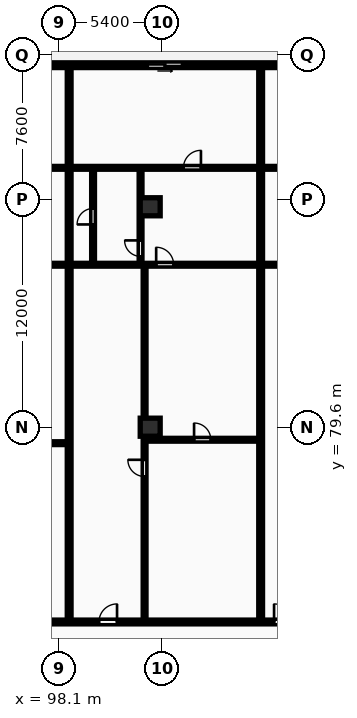
"""IFC4 building model, lengths in metres.
Left out: names, types, materials, properties, quantities, classifications, styles, units other than length and angle.
Written with IfcOpenShell. Run it as: python <this file> out.ifc"""

import sys

from ifc_helpers import new_model, si_unit, direction, frame, frame_2d, origin, origin_2d, place, context, subcontext, project, spatial, rectangle, extrude, element, fill, save


model = new_model("IFC4")
c1 = context("Model", 3, precision=1e-05, world=origin(), true_north=direction((0.0, 1.0)))
c2 = subcontext(c1, "Body", "Model", "MODEL_VIEW")
j1 = project(units=[si_unit("LENGTHUNIT", "METRE"), si_unit("PLANEANGLEUNIT", "RADIAN")], contexts=[c1])
p1 = place(None, origin())
s1 = spatial("IfcSite", under=j1, at=p1, CompositionType="ELEMENT")
p2 = place(p1, origin())
s2 = spatial("IfcBuilding", under=s1, at=p2, CompositionType="ELEMENT")
p3 = place(p2, frame((0.0, 0.0, 24.0)))
s3 = spatial("IfcBuildingStorey", under=s2, at=p3, CompositionType="ELEMENT", Elevation=24.0)
for number, where, z_axis, x_axis in (
    (1, (102.9, 79.6, 0.0), (0.0, 0.0, 1.0), (1.0, 0.0, 0.0)),
    (2, (102.9, 91.2, 0.0), (0.0, 0.0, 1.0), (1.0, 0.0, 0.0)),
):
    element("IfcColumn", number, at=place(p3, frame(where, z_axis=z_axis, x_axis=x_axis)), inside=s3, PredefinedType="COLUMN", context=c2, shape_type="SweptSolid", body=[
        extrude(rectangle(XDim=1.05, YDim=0.95, at=origin_2d()), origin(), (0.0, 0.0, 1.0), 3.25),
    ])
p4 = place(p3, frame((132.9, 98.65, 0.0), z_axis=(0.0, 0.0, 1.0), x_axis=(-1.0, 0.0, 0.0)))
e3 = element("IfcWall", 3, at=p4, inside=s3, PredefinedType="STANDARD", context=c2, shape_type="SweptSolid", body=[
    extrude(rectangle(XDim=77.6, YDim=0.25, at=frame_2d((38.8, 0.0))), origin(), (0.0, 0.0, 1.0), 2.97),
])
p5 = place(p4, frame((71.661, 0.0, 0.0)))
e4 = element("IfcOpeningElement", 4, at=p5, cuts=e3, PredefinedType="OPENING", context=c2, shape_type="SweptSolid", body=[
    extrude(rectangle(XDim=1.8, YDim=2.2, at=frame_2d((0.9, 1.1))), frame((0.0, 0.135, 0.0), z_axis=(0.0, -1.0, 0.0), x_axis=(1.0, 0.0, 0.0)), (0.0, 0.0, 1.0), 0.27),
])
p6 = place(p4, frame((61.079, 0.0, 0.0)))
e5 = element("IfcOpeningElement", 5, at=p6, cuts=e3, PredefinedType="OPENING", context=c2, shape_type="SweptSolid", body=[
    extrude(rectangle(XDim=1.8, YDim=2.2, at=frame_2d((0.9, 1.1))), frame((0.0, 0.135, 0.0), z_axis=(0.0, -1.0, 0.0), x_axis=(1.0, 0.0, 0.0)), (0.0, 0.0, 1.0), 0.27),
])
p7 = place(p4, frame((50.498, 0.0, 0.0)))
e6 = element("IfcOpeningElement", 6, at=p7, cuts=e3, PredefinedType="OPENING", context=c2, shape_type="SweptSolid", body=[
    extrude(rectangle(XDim=1.8, YDim=2.2, at=frame_2d((0.9, 1.1))), frame((0.0, 0.135, 0.0), z_axis=(0.0, -1.0, 0.0), x_axis=(1.0, 0.0, 0.0)), (0.0, 0.0, 1.0), 0.27),
])
p8 = place(p4, frame((39.412, 0.0, 0.0)))
e7 = element("IfcOpeningElement", 7, at=p8, cuts=e3, PredefinedType="OPENING", context=c2, shape_type="SweptSolid", body=[
    extrude(rectangle(XDim=1.8, YDim=2.2, at=frame_2d((0.9, 1.1))), frame((0.0, 0.135, 0.0), z_axis=(0.0, -1.0, 0.0), x_axis=(1.0, 0.0, 0.0)), (0.0, 0.0, 1.0), 0.27),
])
p9 = place(p4, frame((28.326, 0.0, 0.0)))
e8 = element("IfcOpeningElement", 8, at=p9, cuts=e3, PredefinedType="OPENING", context=c2, shape_type="SweptSolid", body=[
    extrude(rectangle(XDim=1.8, YDim=2.2, at=frame_2d((0.9, 1.1))), frame((0.0, 0.135, 0.0), z_axis=(0.0, -1.0, 0.0), x_axis=(1.0, 0.0, 0.0)), (0.0, 0.0, 1.0), 0.27),
])
p10 = place(p4, frame((17.744, 0.0, 0.0)))
e9 = element("IfcOpeningElement", 9, at=p10, cuts=e3, PredefinedType="OPENING", context=c2, shape_type="SweptSolid", body=[
    extrude(rectangle(XDim=1.8, YDim=2.2, at=frame_2d((0.9, 1.1))), frame((0.0, 0.135, 0.0), z_axis=(0.0, -1.0, 0.0), x_axis=(1.0, 0.0, 0.0)), (0.0, 0.0, 1.0), 0.27),
])
p11 = place(p4, frame((6.901, 0.0, 0.0)))
e10 = element("IfcOpeningElement", 10, at=p11, cuts=e3, PredefinedType="OPENING", context=c2, shape_type="SweptSolid", body=[
    extrude(rectangle(XDim=1.8, YDim=2.2, at=frame_2d((0.9, 1.1))), frame((0.0, 0.135, 0.0), z_axis=(0.0, -1.0, 0.0), x_axis=(1.0, 0.0, 0.0)), (0.0, 0.0, 1.0), 0.27),
])
p12 = place(p4, frame((0.6, 0.0, 0.85)))
e11 = element("IfcOpeningElement", 11, at=p12, cuts=e3, PredefinedType="OPENING", context=c2, shape_type="SweptSolid", body=[
    extrude(rectangle(XDim=1.8, YDim=1.8, at=frame_2d((0.9, 0.9))), frame((0.0, 0.135, 0.0), z_axis=(0.0, -1.0, 0.0), x_axis=(1.0, 0.0, 0.0)), (0.0, 0.0, 1.0), 0.27),
])
p13 = place(p3, frame((98.635, 69.43, 0.0), z_axis=(0.0, 0.0, 1.0), x_axis=(0.0, 1.0, 0.0)))
e12 = element("IfcWall", 12, at=p13, inside=s3, PredefinedType="PARTITIONING", context=c2, shape_type="SweptSolid", body=[
    extrude(rectangle(XDim=29.07, YDim=0.2, at=frame_2d((14.535, 0.0))), origin(), (0.0, 0.0, 1.0), 2.97),
])
p14 = place(p3, frame((90.572, 78.76, 0.0), z_axis=(0.0, 0.0, 1.0), x_axis=(1.0, 0.0, 0.0)))
e13 = element("IfcWall", 13, at=p14, inside=s3, PredefinedType="PARTITIONING", context=c2, shape_type="SweptSolid", body=[
    extrude(rectangle(XDim=7.983, YDim=0.15, at=frame_2d((3.992, 0.0))), origin(), (0.0, 0.0, 1.0), 2.97),
])
p15 = place(p14, frame((0.495, 0.0, 0.0)))
e14 = element("IfcOpeningElement", 14, at=p15, cuts=e13, PredefinedType="OPENING", context=c2, shape_type="SweptSolid", body=[
    extrude(rectangle(XDim=0.88, YDim=2.06, at=frame_2d((0.44, 1.03))), frame((0.0, 0.085, 0.0), z_axis=(0.0, -1.0, 0.0), x_axis=(1.0, 0.0, 0.0)), (0.0, 0.0, 1.0), 0.17),
])
p16 = place(p3, frame((86.622, 88.15, 0.0), z_axis=(0.0, 0.0, 1.0), x_axis=(1.0, 0.0, 0.0)))
e15 = element("IfcWall", 15, at=p16, inside=s3, PredefinedType="PARTITIONING", context=c2, shape_type="SweptSolid", body=[
    extrude(rectangle(XDim=11.933, YDim=0.15, at=frame_2d((5.967, 0.0))), origin(), (0.0, 0.0, 1.0), 2.97),
])
p17 = place(p16, frame((5.914, 0.0, 0.0)))
e16 = element("IfcOpeningElement", 16, at=p17, cuts=e15, PredefinedType="OPENING", context=c2, shape_type="SweptSolid", body=[
    extrude(rectangle(XDim=0.92, YDim=2.08, at=frame_2d((0.46, 1.04))), frame((0.0, 0.085, 0.0), z_axis=(0.0, -1.0, 0.0), x_axis=(1.0, 0.0, 0.0)), (0.0, 0.0, 1.0), 0.17),
])
p18 = place(p3, frame((86.622, 93.25, 0.0), z_axis=(0.0, 0.0, 1.0), x_axis=(1.0, 0.0, 0.0)))
e17 = element("IfcWall", 17, at=p18, inside=s3, PredefinedType="PARTITIONING", context=c2, shape_type="SweptSolid", body=[
    extrude(rectangle(XDim=11.933, YDim=0.15, at=frame_2d((5.967, 0.0))), origin(), (0.0, 0.0, 1.0), 2.97),
])
p19 = place(p18, frame((8.812, 0.0, 0.0)))
e18 = element("IfcOpeningElement", 18, at=p19, cuts=e17, PredefinedType="OPENING", context=c2, shape_type="SweptSolid", body=[
    extrude(rectangle(XDim=0.92, YDim=2.08, at=frame_2d((0.46, 1.04))), frame((0.0, 0.085, 0.0), z_axis=(0.0, -1.0, 0.0), x_axis=(1.0, 0.0, 0.0)), (0.0, 0.0, 1.0), 0.17),
])
p20 = place(p3, frame((108.713, 69.43, 0.0), z_axis=(0.0, 0.0, 1.0), x_axis=(0.0, 1.0, 0.0)))
e19 = element("IfcWall", 19, at=p20, inside=s3, PredefinedType="PARTITIONING", context=c2, shape_type="SweptSolid", body=[
    extrude(rectangle(XDim=29.07, YDim=0.2, at=frame_2d((14.535, 0.0))), origin(), (0.0, 0.0, 1.0), 2.97),
])
p21 = place(p3, frame((102.665, 78.94, 0.0), z_axis=(0.0, 0.0, 1.0), x_axis=(1.0, 0.0, 0.0)))
e20 = element("IfcWall", 20, at=p21, inside=s3, PredefinedType="PARTITIONING", context=c2, shape_type="SweptSolid", body=[
    extrude(rectangle(XDim=5.968, YDim=0.15, at=frame_2d((2.984, 0.0))), origin(), (0.0, 0.0, 1.0), 2.97),
])
p22 = place(p21, frame((2.544, 0.0, 0.0)))
e21 = element("IfcOpeningElement", 21, at=p22, cuts=e20, PredefinedType="OPENING", context=c2, shape_type="SweptSolid", body=[
    extrude(rectangle(XDim=0.88, YDim=2.06, at=frame_2d((0.44, 1.03))), frame((0.0, 0.085, 0.0), z_axis=(0.0, -1.0, 0.0), x_axis=(1.0, 0.0, 0.0)), (0.0, 0.0, 1.0), 0.17),
])
p23 = place(p3, frame((102.605, 69.41, 0.0), z_axis=(0.0, 0.0, 1.0), x_axis=(0.0, 1.0, 0.0)))
e22 = element("IfcWall", 22, at=p23, inside=s3, PredefinedType="PARTITIONING", context=c2, shape_type="SweptSolid", body=[
    extrude(rectangle(XDim=18.7, YDim=0.15, at=frame_2d((9.35, 0.0))), origin(), (0.0, 0.0, 1.0), 2.22),
])
p24 = place(p23, frame((7.595, 0.0, 0.0)))
e23 = element("IfcOpeningElement", 23, at=p24, cuts=e22, PredefinedType="OPENING", context=c2, shape_type="SweptSolid", body=[
    extrude(rectangle(XDim=0.88, YDim=2.06, at=frame_2d((0.44, 1.03))), frame((0.0, 0.085, 0.0), z_axis=(0.0, -1.0, 0.0), x_axis=(1.0, 0.0, 0.0)), (0.0, 0.0, 1.0), 0.17),
])
p25 = place(p3, frame((99.893, 88.19, 0.0), z_axis=(0.0, 0.0, 1.0), x_axis=(0.0, 1.0, 0.0)))
e24 = element("IfcWall", 24, at=p25, inside=s3, PredefinedType="PARTITIONING", context=c2, shape_type="SweptSolid", body=[
    extrude(rectangle(XDim=5.0, YDim=0.15, at=frame_2d((2.5, 0.0))), origin(), (0.0, 0.0, 1.0), 2.97),
])
p26 = place(p25, frame((2.08, 0.0, 0.0)))
e25 = element("IfcOpeningElement", 25, at=p26, cuts=e24, PredefinedType="OPENING", context=c2, shape_type="SweptSolid", body=[
    extrude(rectangle(XDim=0.84, YDim=2.04, at=frame_2d((0.42, 1.02))), frame((0.0, 0.085, 0.0), z_axis=(0.0, -1.0, 0.0), x_axis=(1.0, 0.0, 0.0)), (0.0, 0.0, 1.0), 0.17),
])
p27 = place(p3, frame((102.393, 88.19, 0.0), z_axis=(0.0, 0.0, 1.0), x_axis=(0.0, 1.0, 0.0)))
e26 = element("IfcWall", 26, at=p27, inside=s3, PredefinedType="PARTITIONING", context=c2, shape_type="SweptSolid", body=[
    extrude(rectangle(XDim=5.0, YDim=0.15, at=frame_2d((2.5, 0.0))), origin(), (0.0, 0.0, 1.0), 2.97),
])
p28 = place(p27, frame((0.4, 0.0, 0.0)))
e27 = element("IfcOpeningElement", 27, at=p28, cuts=e26, PredefinedType="OPENING", context=c2, shape_type="SweptSolid", body=[
    extrude(rectangle(XDim=0.84, YDim=2.04, at=frame_2d((0.42, 1.02))), frame((0.0, 0.085, 0.0), z_axis=(0.0, -1.0, 0.0), x_axis=(1.0, 0.0, 0.0)), (0.0, 0.0, 1.0), 0.17),
])
p29 = place(p3, frame((98.715, 88.15, 0.0), z_axis=(0.0, 0.0, 1.0), x_axis=(1.0, 0.0, 0.0)))
e28 = element("IfcWall", 28, at=p29, inside=s3, PredefinedType="PARTITIONING", context=c2, shape_type="SweptSolid", body=[
    extrude(rectangle(XDim=9.918, YDim=0.15, at=frame_2d((4.959, 0.0))), origin(), (0.0, 0.0, 1.0), 2.97),
])
p30 = place(p29, frame((4.499, 0.0, 0.0)))
e29 = element("IfcOpeningElement", 29, at=p30, cuts=e28, PredefinedType="OPENING", context=c2, shape_type="SweptSolid", body=[
    extrude(rectangle(XDim=0.92, YDim=2.08, at=frame_2d((0.46, 1.04))), frame((0.0, 0.085, 0.0), z_axis=(0.0, -1.0, 0.0), x_axis=(1.0, 0.0, 0.0)), (0.0, 0.0, 1.0), 0.17),
])
p31 = place(p3, frame((98.715, 93.25, 0.0), z_axis=(0.0, 0.0, 1.0), x_axis=(1.0, 0.0, 0.0)))
e30 = element("IfcWall", 30, at=p31, inside=s3, PredefinedType="PARTITIONING", context=c2, shape_type="SweptSolid", body=[
    extrude(rectangle(XDim=9.918, YDim=0.15, at=frame_2d((4.959, 0.0))), origin(), (0.0, 0.0, 1.0), 2.97),
])
p32 = place(p31, frame((5.936, 0.0, 0.0)))
e31 = element("IfcOpeningElement", 31, at=p32, cuts=e30, PredefinedType="OPENING", context=c2, shape_type="SweptSolid", body=[
    extrude(rectangle(XDim=0.92, YDim=2.08, at=frame_2d((0.46, 1.04))), frame((0.0, 0.085, 0.0), z_axis=(0.0, -1.0, 0.0), x_axis=(1.0, 0.0, 0.0)), (0.0, 0.0, 1.0), 0.17),
])
p33 = place(p3, frame((108.793, 88.15, 0.0), z_axis=(0.0, 0.0, 1.0), x_axis=(1.0, 0.0, 0.0)))
e32 = element("IfcWall", 32, at=p33, inside=s3, PredefinedType="PARTITIONING", context=c2, shape_type="SweptSolid", body=[
    extrude(rectangle(XDim=10.926, YDim=0.15, at=frame_2d((5.463, 0.0))), origin(), (0.0, 0.0, 1.0), 2.97),
])
p34 = place(p33, frame((5.003, 0.0, 0.0)))
e33 = element("IfcOpeningElement", 33, at=p34, cuts=e32, PredefinedType="OPENING", context=c2, shape_type="SweptSolid", body=[
    extrude(rectangle(XDim=0.92, YDim=2.08, at=frame_2d((0.46, 1.04))), frame((0.0, 0.085, 0.0), z_axis=(0.0, -1.0, 0.0), x_axis=(1.0, 0.0, 0.0)), (0.0, 0.0, 1.0), 0.17),
])
p35 = place(p3, frame((108.793, 93.25, 0.0), z_axis=(0.0, 0.0, 1.0), x_axis=(1.0, 0.0, 0.0)))
e34 = element("IfcWall", 34, at=p35, inside=s3, PredefinedType="PARTITIONING", context=c2, shape_type="SweptSolid", body=[
    extrude(rectangle(XDim=10.926, YDim=0.15, at=frame_2d((5.463, 0.0))), origin(), (0.0, 0.0, 1.0), 2.97),
])
p36 = place(p35, frame((5.031, 0.0, 0.0)))
e35 = element("IfcOpeningElement", 35, at=p36, cuts=e34, PredefinedType="OPENING", context=c2, shape_type="SweptSolid", body=[
    extrude(rectangle(XDim=0.92, YDim=2.08, at=frame_2d((0.46, 1.04))), frame((0.0, 0.085, 0.0), z_axis=(0.0, -1.0, 0.0), x_axis=(1.0, 0.0, 0.0)), (0.0, 0.0, 1.0), 0.17),
])
p37 = place(p3, frame((55.3, 69.35, 0.0), z_axis=(0.0, 0.0, 1.0), x_axis=(1.0, 0.0, 0.0)))
e36 = element("IfcWall", 36, at=p37, inside=s3, PredefinedType="PARTITIONING", context=c2, shape_type="SweptSolid", body=[
    extrude(rectangle(XDim=77.6, YDim=0.2, at=frame_2d((38.8, 0.0))), origin(), (0.0, 0.0, 1.0), 2.97),
])
p38 = place(p37, frame((1.81, 0.0, 0.0)))
e37 = element("IfcOpeningElement", 37, at=p38, cuts=e36, PredefinedType="OPENING", context=c2, shape_type="SweptSolid", body=[
    extrude(rectangle(XDim=0.95, YDim=2.15, at=frame_2d((0.475, 1.075))), frame((0.0, 0.11, 0.0), z_axis=(0.0, -1.0, 0.0), x_axis=(1.0, 0.0, 0.0)), (0.0, 0.0, 1.0), 0.22),
])
p39 = place(p37, frame((10.448, 0.0, 0.0)))
e38 = element("IfcOpeningElement", 38, at=p39, cuts=e36, PredefinedType="OPENING", context=c2, shape_type="SweptSolid", body=[
    extrude(rectangle(XDim=0.95, YDim=2.15, at=frame_2d((0.475, 1.075))), frame((0.0, 0.11, 0.0), z_axis=(0.0, -1.0, 0.0), x_axis=(1.0, 0.0, 0.0)), (0.0, 0.0, 1.0), 0.22),
])
p40 = place(p37, frame((23.208, 0.0, 0.0)))
e39 = element("IfcOpeningElement", 39, at=p40, cuts=e36, PredefinedType="OPENING", context=c2, shape_type="SweptSolid", body=[
    extrude(rectangle(XDim=0.95, YDim=2.15, at=frame_2d((0.475, 1.075))), frame((0.0, 0.11, 0.0), z_axis=(0.0, -1.0, 0.0), x_axis=(1.0, 0.0, 0.0)), (0.0, 0.0, 1.0), 0.22),
])
p41 = place(p37, frame((33.287, 0.0, 0.0)))
e40 = element("IfcOpeningElement", 40, at=p41, cuts=e36, PredefinedType="OPENING", context=c2, shape_type="SweptSolid", body=[
    extrude(rectangle(XDim=0.95, YDim=2.15, at=frame_2d((0.475, 1.075))), frame((0.0, 0.11, 0.0), z_axis=(0.0, -1.0, 0.0), x_axis=(1.0, 0.0, 0.0)), (0.0, 0.0, 1.0), 0.22),
])
p42 = place(p37, frame((44.905, 0.0, 0.0)))
e41 = element("IfcOpeningElement", 41, at=p42, cuts=e36, PredefinedType="OPENING", context=c2, shape_type="SweptSolid", body=[
    extrude(rectangle(XDim=0.95, YDim=2.15, at=frame_2d((0.475, 1.075))), frame((0.0, 0.11, 0.0), z_axis=(0.0, -1.0, 0.0), x_axis=(1.0, 0.0, 0.0)), (0.0, 0.0, 1.0), 0.22),
])
p43 = place(p37, frame((54.119, 0.0, 0.0)))
e42 = element("IfcOpeningElement", 42, at=p43, cuts=e36, PredefinedType="OPENING", context=c2, shape_type="SweptSolid", body=[
    extrude(rectangle(XDim=0.95, YDim=2.15, at=frame_2d((0.475, 1.075))), frame((0.0, 0.11, 0.0), z_axis=(0.0, -1.0, 0.0), x_axis=(1.0, 0.0, 0.0)), (0.0, 0.0, 1.0), 0.22),
])
p44 = place(p37, frame((66.74, 0.0, 0.0)))
e43 = element("IfcOpeningElement", 43, at=p44, cuts=e36, PredefinedType="OPENING", context=c2, shape_type="SweptSolid", body=[
    extrude(rectangle(XDim=0.95, YDim=2.15, at=frame_2d((0.475, 1.075))), frame((0.0, 0.11, 0.0), z_axis=(0.0, -1.0, 0.0), x_axis=(1.0, 0.0, 0.0)), (0.0, 0.0, 1.0), 0.22),
])
p45 = place(p9, origin())
e44 = element("IfcDoor", 44, at=p45, inside=s3, OperationType="SLIDING_TO_LEFT", PredefinedType="DOOR", context=c2, shape_type="SweptSolid", body=[
    extrude(rectangle(XDim=1.8, YDim=2.2, at=frame_2d((0.9, 1.1))), frame((0.0, 0.025, 0.0), z_axis=(0.0, -1.0, 0.0), x_axis=(1.0, 0.0, 0.0)), (0.0, 0.0, 1.0), 0.05),
])
fill(e8, e44)
p46 = place(p22, origin())
e45 = element("IfcDoor", 45, at=p46, inside=s3, OperationType="SINGLE_SWING_LEFT", PredefinedType="DOOR", context=c2, shape_type="SweptSolid", body=[
    extrude(rectangle(XDim=0.88, YDim=2.06, at=frame_2d((0.44, 1.03))), frame((0.0, 0.025, 0.0), z_axis=(0.0, -1.0, 0.0), x_axis=(1.0, 0.0, 0.0)), (0.0, 0.0, 1.0), 0.05),
])
fill(e21, e45)
p47 = place(p24, origin())
e46 = element("IfcDoor", 46, at=p47, inside=s3, OperationType="SINGLE_SWING_RIGHT", PredefinedType="DOOR", context=c2, shape_type="SweptSolid", body=[
    extrude(rectangle(XDim=0.88, YDim=2.06, at=frame_2d((0.44, 1.03))), frame((0.0, 0.025, 0.0), z_axis=(0.0, -1.0, 0.0), x_axis=(1.0, 0.0, 0.0)), (0.0, 0.0, 1.0), 0.05),
])
fill(e23, e46)
p48 = place(p26, origin())
e47 = element("IfcDoor", 47, at=p48, inside=s3, OperationType="SINGLE_SWING_LEFT", PredefinedType="DOOR", context=c2, shape_type="SweptSolid", body=[
    extrude(rectangle(XDim=0.84, YDim=2.04, at=frame_2d((0.42, 1.02))), frame((0.0, 0.025, 0.0), z_axis=(0.0, -1.0, 0.0), x_axis=(1.0, 0.0, 0.0)), (0.0, 0.0, 1.0), 0.05),
])
fill(e25, e47)
p49 = place(p28, origin())
e48 = element("IfcDoor", 48, at=p49, inside=s3, OperationType="SINGLE_SWING_RIGHT", PredefinedType="DOOR", context=c2, shape_type="SweptSolid", body=[
    extrude(rectangle(XDim=0.84, YDim=2.04, at=frame_2d((0.42, 1.02))), frame((0.0, 0.025, 0.0), z_axis=(0.0, -1.0, 0.0), x_axis=(1.0, 0.0, 0.0)), (0.0, 0.0, 1.0), 0.05),
])
fill(e27, e48)
p50 = place(p30, origin())
e49 = element("IfcDoor", 49, at=p50, inside=s3, OperationType="SINGLE_SWING_LEFT", PredefinedType="DOOR", context=c2, shape_type="SweptSolid", body=[
    extrude(rectangle(XDim=0.92, YDim=2.08, at=frame_2d((0.46, 1.04))), frame((0.0, 0.025, 0.0), z_axis=(0.0, -1.0, 0.0), x_axis=(1.0, 0.0, 0.0)), (0.0, 0.0, 1.0), 0.05),
])
fill(e29, e49)
p51 = place(p32, origin())
e50 = element("IfcDoor", 50, at=p51, inside=s3, OperationType="SINGLE_SWING_RIGHT", PredefinedType="DOOR", context=c2, shape_type="SweptSolid", body=[
    extrude(rectangle(XDim=0.92, YDim=2.08, at=frame_2d((0.46, 1.04))), frame((0.0, 0.025, 0.0), z_axis=(0.0, -1.0, 0.0), x_axis=(1.0, 0.0, 0.0)), (0.0, 0.0, 1.0), 0.05),
])
fill(e31, e50)
p52 = place(p42, origin())
e51 = element("IfcDoor", 51, at=p52, inside=s3, OperationType="SINGLE_SWING_RIGHT", PredefinedType="DOOR", context=c2, shape_type="SweptSolid", body=[
    extrude(rectangle(XDim=0.95, YDim=2.15, at=frame_2d((0.475, 1.075))), frame((0.0, 0.025, 0.0), z_axis=(0.0, -1.0, 0.0), x_axis=(1.0, 0.0, 0.0)), (0.0, 0.0, 1.0), 0.05),
])
fill(e41, e51)
p53 = place(p43, origin())
e52 = element("IfcDoor", 52, at=p53, inside=s3, OperationType="SINGLE_SWING_LEFT", PredefinedType="DOOR", context=c2, shape_type="SweptSolid", body=[
    extrude(rectangle(XDim=0.95, YDim=2.15, at=frame_2d((0.475, 1.075))), frame((0.0, 0.025, 0.0), z_axis=(0.0, -1.0, 0.0), x_axis=(1.0, 0.0, 0.0)), (0.0, 0.0, 1.0), 0.05),
])
fill(e42, e52)
save(model, sys.argv[1])
